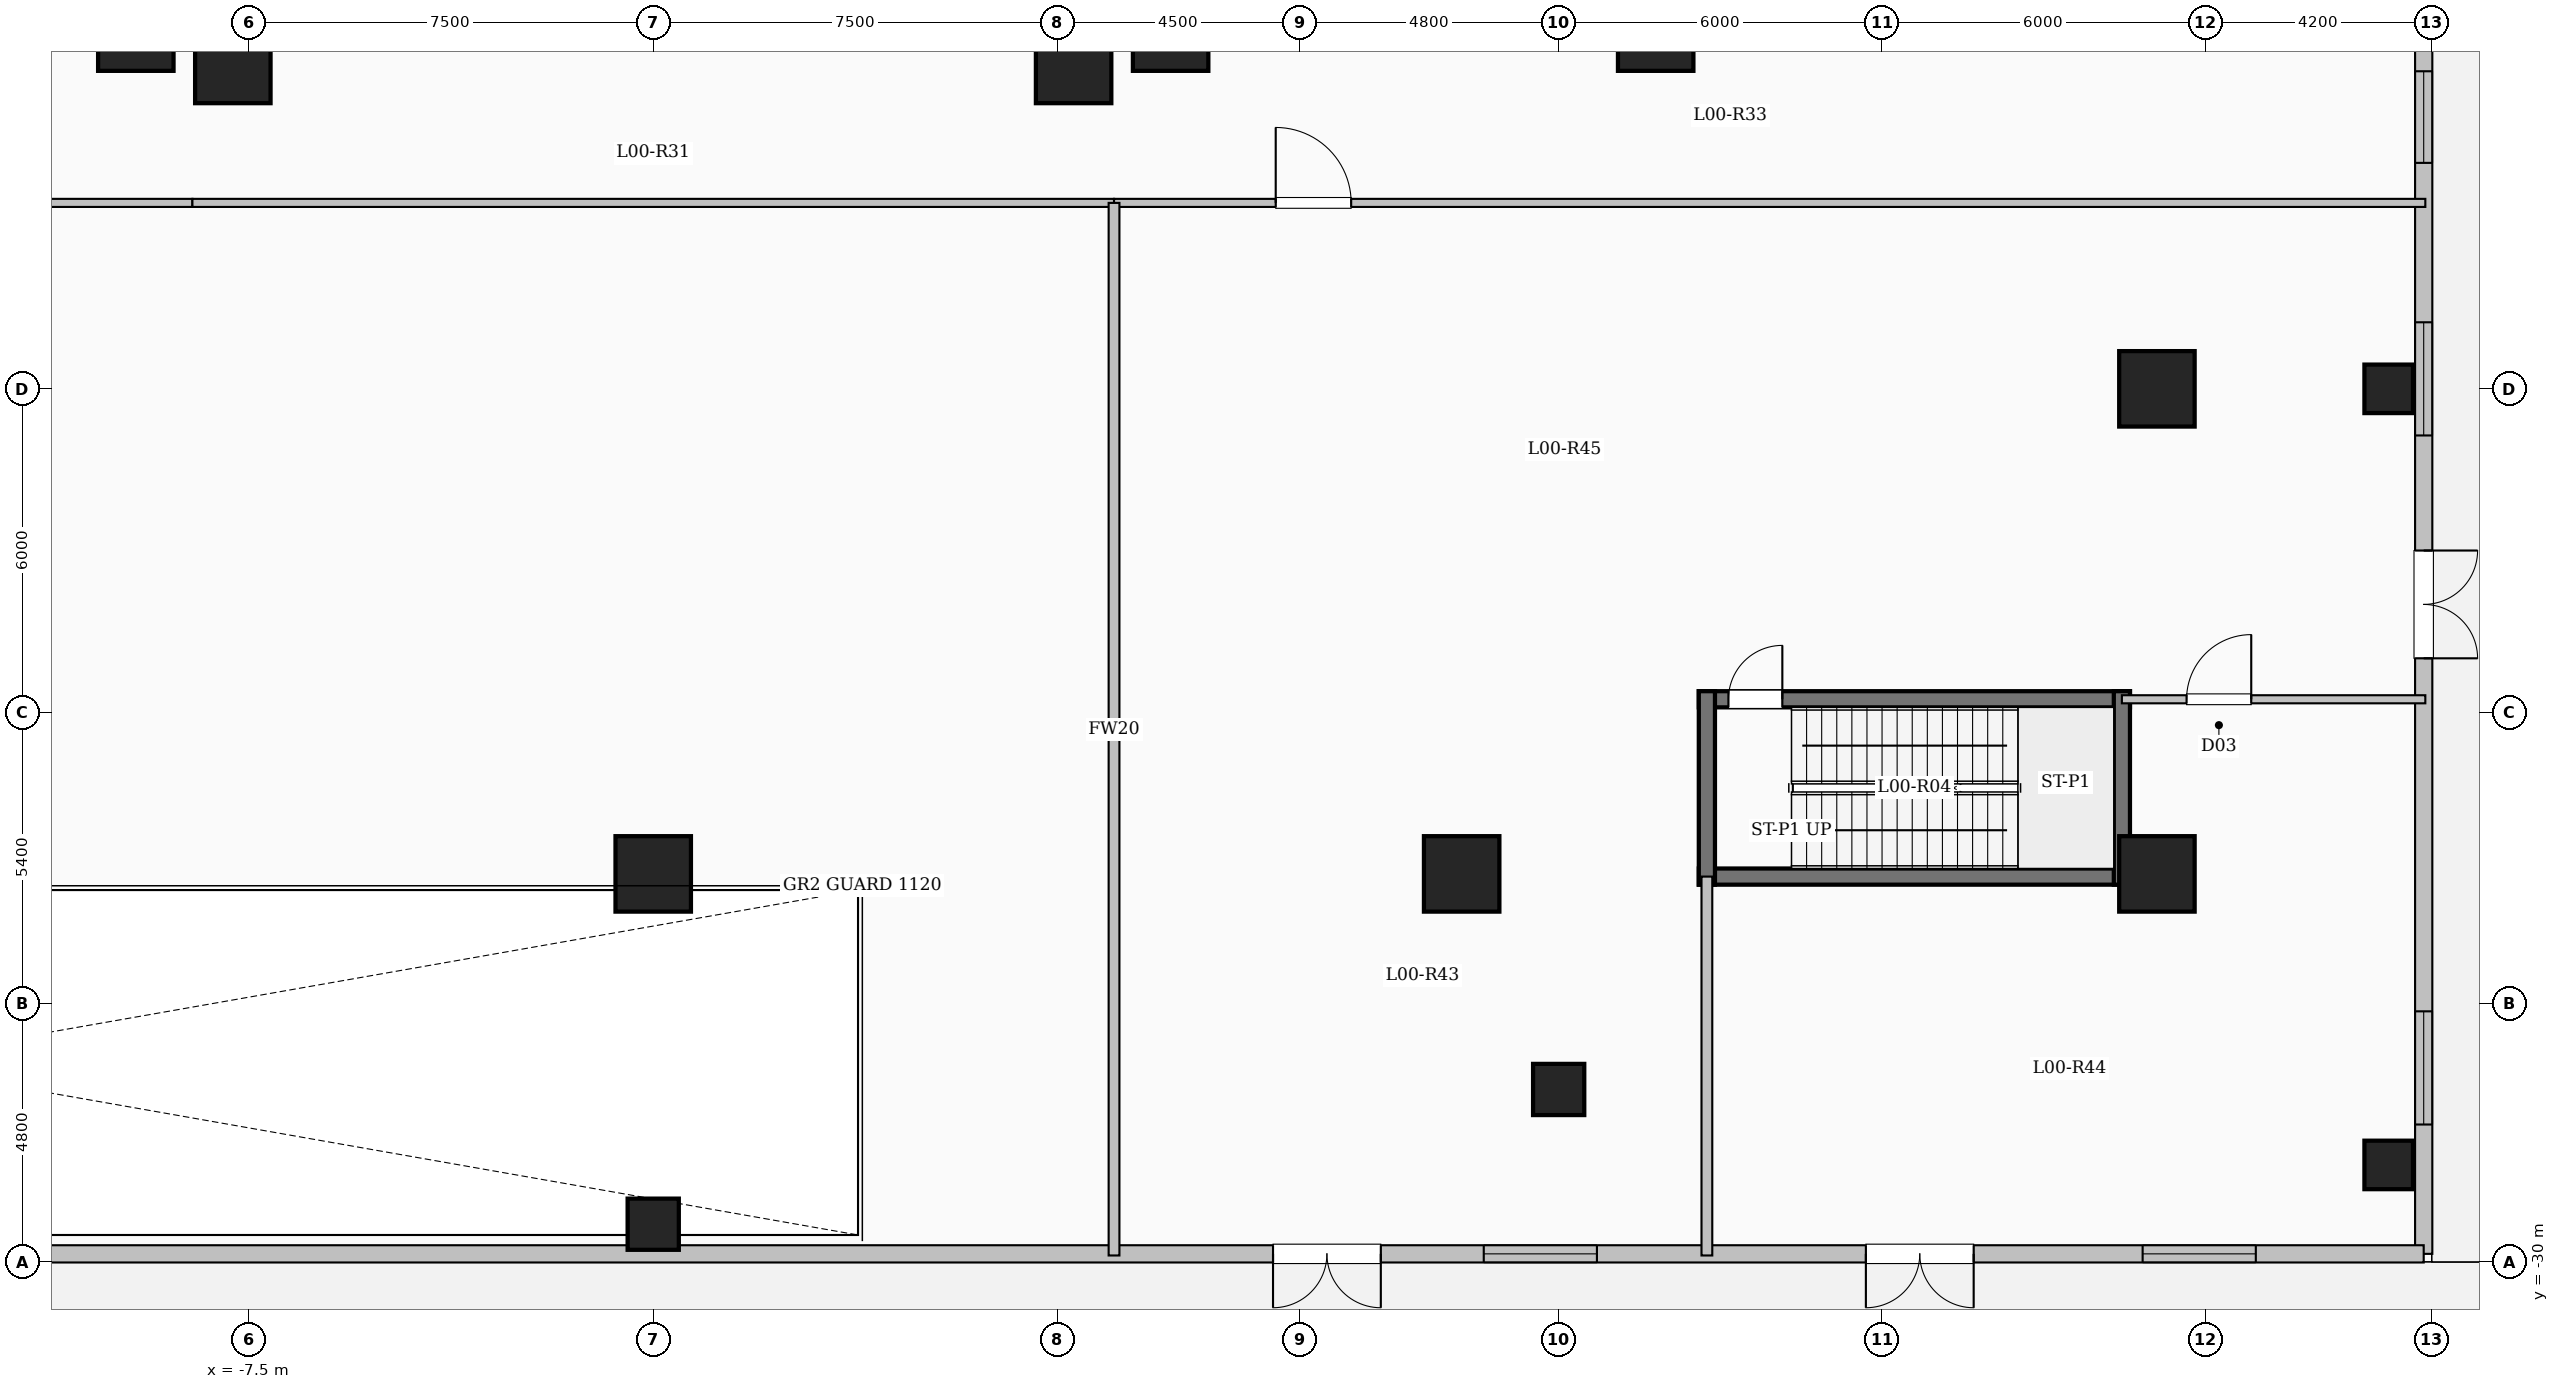
"""IFC4 building model, lengths in metres.
Left out: names, types, materials, properties, quantities, classifications, styles, units other than length and angle.
Written with IfcOpenShell. Run it as: python <this file> out.ifc"""

import sys

from ifc_helpers import new_model, si_unit, direction, frame, frame_2d, origin, origin_2d, place, context, subcontext, project, spatial, rectangle, circle, extrude, element, fill, save


model = new_model("IFC4")
c1 = context("Model", 3, precision=1e-05, world=origin(), true_north=direction((0.0, 1.0)))
c2 = subcontext(c1, "Body", "Model", "MODEL_VIEW")
j1 = project(units=[si_unit("LENGTHUNIT", "METRE"), si_unit("PLANEANGLEUNIT", "RADIAN")], contexts=[c1])
p1 = place(None, origin())
s1 = spatial("IfcSite", under=j1, at=p1, CompositionType="ELEMENT")
p2 = place(p1, origin())
s2 = spatial("IfcBuilding", under=s1, at=p2, CompositionType="ELEMENT")
p3 = place(p2, origin())
s3 = spatial("IfcBuildingStorey", under=s2, at=p3, CompositionType="ELEMENT", Elevation=0.0)
for number, where, z_axis, x_axis in (
    (1, (-7.8, -7.8, 0.0), (0.0, 0.0, 1.0), (1.0, 0.0, 0.0)),
    (2, (7.8, -7.8, 0.0), (0.0, 0.0, 1.0), (1.0, 0.0, 0.0)),
    (3, (-9.6, -7.2, 0.0), (0.0, 0.0, 1.0), (1.0, 0.0, 0.0)),
    (4, (9.6, -7.2, 0.0), (0.0, 0.0, 1.0), (1.0, 0.0, 0.0)),
    (5, (18.6, -7.2, 0.0), (0.0, 0.0, 1.0), (1.0, 0.0, 0.0)),
):
    element("IfcColumn", number, at=place(p3, frame(where, z_axis=z_axis, x_axis=x_axis)), inside=s3, PredefinedType="COLUMN", context=c2, shape_type="SweptSolid", body=[
        extrude(rectangle(XDim=1.4, YDim=1.4, at=origin_2d()), origin(), (0.0, 0.0, 1.0), 5.4),
    ])
for number, where, z_axis, x_axis in (
    (6, (32.2, -28.2, 0.0), (0.0, 0.0, 1.0), (1.0, 0.0, 0.0)),
    (7, (32.2, -13.8, 0.0), (0.0, 0.0, 1.0), (1.0, 0.0, 0.0)),
):
    element("IfcColumn", number, at=place(p3, frame(where, z_axis=z_axis, x_axis=x_axis)), inside=s3, PredefinedType="COLUMN", context=c2, shape_type="SweptSolid", body=[
        extrude(rectangle(XDim=0.9, YDim=0.9, at=origin_2d()), origin(), (0.0, 0.0, 1.0), 5.4),
    ])
for number, where, z_axis, x_axis in (
    (8, (0.0, -29.3, 0.0), (0.0, 0.0, 1.0), (1.0, 0.0, 0.0)),
    (9, (16.8, -26.8, 0.0), (0.0, 0.0, 1.0), (1.0, 0.0, 0.0)),
):
    element("IfcColumn", number, at=place(p3, frame(where, z_axis=z_axis, x_axis=x_axis)), inside=s3, PredefinedType="PILASTER", context=c2, shape_type="SweptSolid", body=[
        extrude(circle(Radius=0.475, at=origin_2d()), origin(), (0.0, 0.0, 1.0), 5.4),
    ])
for number, where, z_axis, x_axis in (
    (10, (0.0, -22.8, 0.0), (0.0, 0.0, 1.0), (1.0, 0.0, 0.0)),
    (11, (15.0, -22.8, 0.0), (0.0, 0.0, 1.0), (1.0, 0.0, 0.0)),
    (12, (27.9, -22.8, 0.0), (0.0, 0.0, 1.0), (1.0, 0.0, 0.0)),
    (13, (27.9, -13.8, 0.0), (0.0, 0.0, 1.0), (1.0, 0.0, 0.0)),
):
    element("IfcColumn", number, at=place(p3, frame(where, z_axis=z_axis, x_axis=x_axis)), inside=s3, PredefinedType="COLUMN", context=c2, shape_type="SweptSolid", body=[
        extrude(rectangle(XDim=1.4, YDim=1.4, at=origin_2d()), origin(), (0.0, 0.0, 1.0), 5.4),
    ])
p4 = place(p3, frame((32.85, 29.85, 0.0), z_axis=(0.0, 0.0, 1.0), x_axis=(0.0, -1.0, 0.0)))
e14 = element("IfcWall", 14, at=p4, inside=s3, PredefinedType="SOLIDWALL", context=c2, shape_type="SweptSolid", body=[
    extrude(rectangle(XDim=59.7, YDim=0.32, at=frame_2d((29.85, 0.0))), origin(), (0.0, 0.0, 1.0), 5.1),
])
p5 = place(p4, frame((17.55, 0.0, 0.0)))
e15 = element("IfcOpeningElement", 15, at=p5, cuts=e14, PredefinedType="OPENING", context=c2, shape_type="SweptSolid", body=[
    extrude(rectangle(XDim=1.35, YDim=2.2, at=frame_2d((0.675, 1.1))), frame((0.0, 0.17, 0.0), z_axis=(0.0, -1.0, 0.0), x_axis=(1.0, 0.0, 0.0)), (0.0, 0.0, 1.0), 0.34),
])
p6 = place(p4, frame((46.65, 0.0, 0.0)))
e16 = element("IfcOpeningElement", 16, at=p6, cuts=e14, PredefinedType="OPENING", context=c2, shape_type="SweptSolid", body=[
    extrude(rectangle(XDim=2.0, YDim=2.4, at=frame_2d((1.0, 1.2))), frame((0.0, 0.17, 0.0), z_axis=(0.0, -1.0, 0.0), x_axis=(1.0, 0.0, 0.0)), (0.0, 0.0, 1.0), 0.34),
])
p7 = place(p4, frame((24.35, 0.0, 0.0)))
e17 = element("IfcOpeningElement", 17, at=p7, cuts=e14, PredefinedType="OPENING", context=c2, shape_type="SweptSolid", body=[
    extrude(rectangle(XDim=3.0, YDim=2.8, at=frame_2d((1.5, 1.4))), frame((0.0, 0.17, 0.0), z_axis=(0.0, -1.0, 0.0), x_axis=(1.0, 0.0, 0.0)), (0.0, 0.0, 1.0), 0.34),
])
p8 = place(p4, frame((7.6, 0.0, 0.9)))
e18 = element("IfcOpeningElement", 18, at=p8, cuts=e14, PredefinedType="OPENING", context=c2, shape_type="SweptSolid", body=[
    extrude(rectangle(XDim=2.1, YDim=2.0, at=frame_2d((1.05, 1.0))), frame((0.0, 0.17, 0.0), z_axis=(0.0, -1.0, 0.0), x_axis=(1.0, 0.0, 0.0)), (0.0, 0.0, 1.0), 0.34),
])
p9 = place(p4, frame((37.758, 0.0, 0.9)))
e19 = element("IfcOpeningElement", 19, at=p9, cuts=e14, PredefinedType="OPENING", context=c2, shape_type="SweptSolid", body=[
    extrude(rectangle(XDim=1.7, YDim=1.9, at=frame_2d((0.85, 0.95))), frame((0.0, 0.17, 0.0), z_axis=(0.0, -1.0, 0.0), x_axis=(1.0, 0.0, 0.0)), (0.0, 0.0, 1.0), 0.34),
])
p10 = place(p4, frame((42.415, 0.0, 0.9)))
e20 = element("IfcOpeningElement", 20, at=p10, cuts=e14, PredefinedType="OPENING", context=c2, shape_type="SweptSolid", body=[
    extrude(rectangle(XDim=2.1, YDim=2.0, at=frame_2d((1.05, 1.0))), frame((0.0, 0.17, 0.0), z_axis=(0.0, -1.0, 0.0), x_axis=(1.0, 0.0, 0.0)), (0.0, 0.0, 1.0), 0.34),
])
p11 = place(p4, frame((55.2, 0.0, 0.9)))
e21 = element("IfcOpeningElement", 21, at=p11, cuts=e14, PredefinedType="OPENING", context=c2, shape_type="SweptSolid", body=[
    extrude(rectangle(XDim=2.1, YDim=2.0, at=frame_2d((1.05, 1.0))), frame((0.0, 0.17, 0.0), z_axis=(0.0, -1.0, 0.0), x_axis=(1.0, 0.0, 0.0)), (0.0, 0.0, 1.0), 0.34),
])
p12 = place(p3, frame((32.85, -29.85, 0.0), z_axis=(0.0, 0.0, 1.0), x_axis=(-1.0, 0.0, 0.0)))
e22 = element("IfcWall", 22, at=p12, inside=s3, PredefinedType="SOLIDWALL", context=c2, shape_type="SweptSolid", body=[
    extrude(rectangle(XDim=65.7, YDim=0.32, at=frame_2d((32.85, 0.0))), origin(), (0.0, 0.0, 1.0), 5.1),
])
p13 = place(p12, frame((8.35, 0.0, 0.0)))
e23 = element("IfcOpeningElement", 23, at=p13, cuts=e22, PredefinedType="OPENING", context=c2, shape_type="SweptSolid", body=[
    extrude(rectangle(XDim=2.0, YDim=2.4, at=frame_2d((1.0, 1.2))), frame((0.0, 0.17, 0.0), z_axis=(0.0, -1.0, 0.0), x_axis=(1.0, 0.0, 0.0)), (0.0, 0.0, 1.0), 0.34),
])
p14 = place(p12, frame((19.35, 0.0, 0.0)))
e24 = element("IfcOpeningElement", 24, at=p14, cuts=e22, PredefinedType="OPENING", context=c2, shape_type="SweptSolid", body=[
    extrude(rectangle(XDim=2.0, YDim=2.4, at=frame_2d((1.0, 1.2))), frame((0.0, 0.17, 0.0), z_axis=(0.0, -1.0, 0.0), x_axis=(1.0, 0.0, 0.0)), (0.0, 0.0, 1.0), 0.34),
])
p15 = place(p12, frame((3.115, 0.0, 0.9)))
e25 = element("IfcOpeningElement", 25, at=p15, cuts=e22, PredefinedType="OPENING", context=c2, shape_type="SweptSolid", body=[
    extrude(rectangle(XDim=2.1, YDim=2.0, at=frame_2d((1.05, 1.0))), frame((0.0, 0.17, 0.0), z_axis=(0.0, -1.0, 0.0), x_axis=(1.0, 0.0, 0.0)), (0.0, 0.0, 1.0), 0.34),
])
p16 = place(p12, frame((15.34, 0.0, 0.9)))
e26 = element("IfcOpeningElement", 26, at=p16, cuts=e22, PredefinedType="OPENING", context=c2, shape_type="SweptSolid", body=[
    extrude(rectangle(XDim=2.1, YDim=2.0, at=frame_2d((1.05, 1.0))), frame((0.0, 0.17, 0.0), z_axis=(0.0, -1.0, 0.0), x_axis=(1.0, 0.0, 0.0)), (0.0, 0.0, 1.0), 0.34),
])
p17 = place(p3, frame((19.4, -19.56, 0.0), z_axis=(0.0, 0.0, 1.0), x_axis=(1.0, 0.0, 0.0)))
e27 = element("IfcWall", 27, at=p17, inside=s3, PredefinedType="SHEAR", context=c2, shape_type="SweptSolid", body=[
    extrude(rectangle(XDim=8.0, YDim=0.3, at=frame_2d((4.0, 0.0))), origin(), (0.0, 0.0, 1.0), 5.4),
])
p18 = place(p17, frame((0.55, 0.0, 0.0)))
e28 = element("IfcOpeningElement", 28, at=p18, cuts=e27, PredefinedType="OPENING", context=c2, shape_type="SweptSolid", body=[
    extrude(rectangle(XDim=1.0, YDim=2.15, at=frame_2d((0.5, 1.075))), frame((0.0, 0.16, 0.0), z_axis=(0.0, -1.0, 0.0), x_axis=(1.0, 0.0, 0.0)), (0.0, 0.0, 1.0), 0.32),
])
p19 = place(p3, frame((19.4, -22.85, 0.0), z_axis=(0.0, 0.0, 1.0), x_axis=(1.0, 0.0, 0.0)))
e29 = element("IfcWall", 29, at=p19, inside=s3, PredefinedType="SHEAR", context=c2, shape_type="SweptSolid", body=[
    extrude(rectangle(XDim=8.0, YDim=0.3, at=frame_2d((4.0, 0.0))), origin(), (0.0, 0.0, 1.0), 5.4),
])
for number, where, z_axis, x_axis in (
    (30, (19.55, -23.0, 0.0), (0.0, 0.0, 1.0), (0.0, 1.0, 0.0)),
    (31, (27.25, -23.0, 0.0), (0.0, 0.0, 1.0), (0.0, 1.0, 0.0)),
):
    element("IfcWall", number, at=place(p3, frame(where, z_axis=z_axis, x_axis=x_axis)), inside=s3, PredefinedType="SHEAR", context=c2, shape_type="SweptSolid", body=[
        extrude(rectangle(XDim=3.59, YDim=0.3, at=frame_2d((1.795, 0.0))), origin(), (0.0, 0.0, 1.0), 5.4),
    ])
p20 = place(p3, frame((-32.88, -10.35, 0.0), z_axis=(0.0, 0.0, 1.0), x_axis=(1.0, 0.0, 0.0)))
e32 = element("IfcWall", 32, at=p20, inside=s3, PredefinedType="PARTITIONING", context=c2, shape_type="SweptSolid", body=[
    extrude(rectangle(XDim=24.33, YDim=0.15, at=frame_2d((12.165, 0.0))), origin(), (0.0, 0.0, 1.0), 5.1),
])
p21 = place(p3, frame((-8.55, -10.35, 0.0), z_axis=(0.0, 0.0, 1.0), x_axis=(1.0, 0.0, 0.0)))
e33 = element("IfcWall", 33, at=p21, inside=s3, PredefinedType="PARTITIONING", context=c2, shape_type="SweptSolid", body=[
    extrude(rectangle(XDim=17.1, YDim=0.15, at=frame_2d((8.55, 0.0))), origin(), (0.0, 0.0, 1.0), 5.1),
])
p22 = place(p3, frame((8.55, -10.35, 0.0), z_axis=(0.0, 0.0, 1.0), x_axis=(1.0, 0.0, 0.0)))
e34 = element("IfcWall", 34, at=p22, inside=s3, PredefinedType="PARTITIONING", context=c2, shape_type="SweptSolid", body=[
    extrude(rectangle(XDim=24.33, YDim=0.15, at=frame_2d((12.165, 0.0))), origin(), (0.0, 0.0, 1.0), 5.1),
])
p23 = place(p22, frame((3.0, 0.0, 0.0)))
e35 = element("IfcOpeningElement", 35, at=p23, cuts=e34, PredefinedType="OPENING", context=c2, shape_type="SweptSolid", body=[
    extrude(rectangle(XDim=1.4, YDim=2.2, at=frame_2d((0.7, 1.1))), frame((0.0, 0.085, 0.0), z_axis=(0.0, -1.0, 0.0), x_axis=(1.0, 0.0, 0.0)), (0.0, 0.0, 1.0), 0.17),
])
p24 = place(p3, frame((8.55, -29.88, 0.0), z_axis=(0.0, 0.0, 1.0), x_axis=(0.0, 1.0, 0.0)))
e36 = element("IfcWall", 36, at=p24, inside=s3, PredefinedType="SOLIDWALL", context=c2, shape_type="SweptSolid", body=[
    extrude(rectangle(XDim=19.53, YDim=0.2, at=frame_2d((9.765, 0.0))), origin(), (0.0, 0.0, 1.0), 5.1),
])
p25 = place(p3, frame((19.55, -29.88, 0.0), z_axis=(0.0, 0.0, 1.0), x_axis=(0.0, 1.0, 0.0)))
e37 = element("IfcWall", 37, at=p25, inside=s3, PredefinedType="SOLIDWALL", context=c2, shape_type="SweptSolid", body=[
    extrude(rectangle(XDim=7.03, YDim=0.2, at=frame_2d((3.515, 0.0))), origin(), (0.0, 0.0, 1.0), 5.1),
])
p26 = place(p3, frame((27.25, -19.56, 0.0), z_axis=(0.0, 0.0, 1.0), x_axis=(1.0, 0.0, 0.0)))
e38 = element("IfcWall", 38, at=p26, inside=s3, PredefinedType="PARTITIONING", context=c2, shape_type="SweptSolid", body=[
    extrude(rectangle(XDim=5.63, YDim=0.15, at=frame_2d((2.815, 0.0))), origin(), (0.0, 0.0, 1.0), 5.1),
])
p27 = place(p26, frame((1.2, 0.0, 0.0)))
e39 = element("IfcOpeningElement", 39, at=p27, cuts=e38, PredefinedType="OPENING", context=c2, shape_type="SweptSolid", body=[
    extrude(rectangle(XDim=1.2, YDim=2.2, at=frame_2d((0.6, 1.1))), frame((0.0, 0.085, 0.0), z_axis=(0.0, -1.0, 0.0), x_axis=(1.0, 0.0, 0.0)), (0.0, 0.0, 1.0), 0.17),
])
p28 = place(p6, origin())
e40 = element("IfcDoor", 40, at=p28, inside=s3, OperationType="DOUBLE_DOOR_SINGLE_SWING", PredefinedType="DOOR", context=c2, shape_type="SweptSolid", body=[
    extrude(rectangle(XDim=2.0, YDim=2.4, at=frame_2d((1.0, 1.2))), frame((0.0, 0.025, 0.0), z_axis=(0.0, -1.0, 0.0), x_axis=(1.0, 0.0, 0.0)), (0.0, 0.0, 1.0), 0.05),
])
fill(e16, e40)
p29 = place(p9, origin())
e41 = element("IfcWindow", 41, at=p29, inside=s3, PartitioningType="SINGLE_PANEL", PredefinedType="WINDOW", context=c2, shape_type="SweptSolid", body=[
    extrude(rectangle(XDim=1.7, YDim=1.9, at=frame_2d((0.85, 0.95))), frame((0.0, 0.03, 0.0), z_axis=(0.0, -1.0, 0.0), x_axis=(1.0, 0.0, 0.0)), (0.0, 0.0, 1.0), 0.06),
])
fill(e19, e41)
p30 = place(p10, origin())
e42 = element("IfcWindow", 42, at=p30, inside=s3, PartitioningType="SINGLE_PANEL", PredefinedType="WINDOW", context=c2, shape_type="SweptSolid", body=[
    extrude(rectangle(XDim=2.1, YDim=2.0, at=frame_2d((1.05, 1.0))), frame((0.0, 0.03, 0.0), z_axis=(0.0, -1.0, 0.0), x_axis=(1.0, 0.0, 0.0)), (0.0, 0.0, 1.0), 0.06),
])
fill(e20, e42)
p31 = place(p11, origin())
e43 = element("IfcWindow", 43, at=p31, inside=s3, PartitioningType="SINGLE_PANEL", PredefinedType="WINDOW", context=c2, shape_type="SweptSolid", body=[
    extrude(rectangle(XDim=2.1, YDim=2.0, at=frame_2d((1.05, 1.0))), frame((0.0, 0.03, 0.0), z_axis=(0.0, -1.0, 0.0), x_axis=(1.0, 0.0, 0.0)), (0.0, 0.0, 1.0), 0.06),
])
fill(e21, e43)
p32 = place(p13, origin())
e44 = element("IfcDoor", 44, at=p32, inside=s3, OperationType="DOUBLE_DOOR_SINGLE_SWING", PredefinedType="DOOR", context=c2, shape_type="SweptSolid", body=[
    extrude(rectangle(XDim=2.0, YDim=2.4, at=frame_2d((1.0, 1.2))), frame((0.0, 0.025, 0.0), z_axis=(0.0, -1.0, 0.0), x_axis=(1.0, 0.0, 0.0)), (0.0, 0.0, 1.0), 0.05),
])
fill(e23, e44)
p33 = place(p14, origin())
e45 = element("IfcDoor", 45, at=p33, inside=s3, OperationType="DOUBLE_DOOR_SINGLE_SWING", PredefinedType="DOOR", context=c2, shape_type="SweptSolid", body=[
    extrude(rectangle(XDim=2.0, YDim=2.4, at=frame_2d((1.0, 1.2))), frame((0.0, 0.025, 0.0), z_axis=(0.0, -1.0, 0.0), x_axis=(1.0, 0.0, 0.0)), (0.0, 0.0, 1.0), 0.05),
])
fill(e24, e45)
p34 = place(p15, origin())
e46 = element("IfcWindow", 46, at=p34, inside=s3, PartitioningType="SINGLE_PANEL", PredefinedType="WINDOW", context=c2, shape_type="SweptSolid", body=[
    extrude(rectangle(XDim=2.1, YDim=2.0, at=frame_2d((1.05, 1.0))), frame((0.0, 0.03, 0.0), z_axis=(0.0, -1.0, 0.0), x_axis=(1.0, 0.0, 0.0)), (0.0, 0.0, 1.0), 0.06),
])
fill(e25, e46)
p35 = place(p16, origin())
e47 = element("IfcWindow", 47, at=p35, inside=s3, PartitioningType="SINGLE_PANEL", PredefinedType="WINDOW", context=c2, shape_type="SweptSolid", body=[
    extrude(rectangle(XDim=2.1, YDim=2.0, at=frame_2d((1.05, 1.0))), frame((0.0, 0.03, 0.0), z_axis=(0.0, -1.0, 0.0), x_axis=(1.0, 0.0, 0.0)), (0.0, 0.0, 1.0), 0.06),
])
fill(e26, e47)
p36 = place(p18, origin())
e48 = element("IfcDoor", 48, at=p36, inside=s3, OperationType="SINGLE_SWING_RIGHT", PredefinedType="DOOR", context=c2, shape_type="SweptSolid", body=[
    extrude(rectangle(XDim=1.0, YDim=2.15, at=frame_2d((0.5, 1.075))), frame((0.0, 0.025, 0.0), z_axis=(0.0, -1.0, 0.0), x_axis=(1.0, 0.0, 0.0)), (0.0, 0.0, 1.0), 0.05),
])
fill(e28, e48)
p37 = place(p23, origin())
e49 = element("IfcDoor", 49, at=p37, inside=s3, OperationType="SINGLE_SWING_LEFT", PredefinedType="DOOR", context=c2, shape_type="SweptSolid", body=[
    extrude(rectangle(XDim=1.4, YDim=2.2, at=frame_2d((0.7, 1.1))), frame((0.0, 0.025, 0.0), z_axis=(0.0, -1.0, 0.0), x_axis=(1.0, 0.0, 0.0)), (0.0, 0.0, 1.0), 0.05),
])
fill(e35, e49)
p38 = place(p27, origin())
e50 = element("IfcDoor", 50, at=p38, inside=s3, OperationType="SINGLE_SWING_RIGHT", PredefinedType="DOOR", context=c2, shape_type="SweptSolid", body=[
    extrude(rectangle(XDim=1.2, YDim=2.2, at=frame_2d((0.6, 1.1))), frame((0.0, 0.025, 0.0), z_axis=(0.0, -1.0, 0.0), x_axis=(1.0, 0.0, 0.0)), (0.0, 0.0, 1.0), 0.05),
])
fill(e39, e50)
save(model, sys.argv[1])
